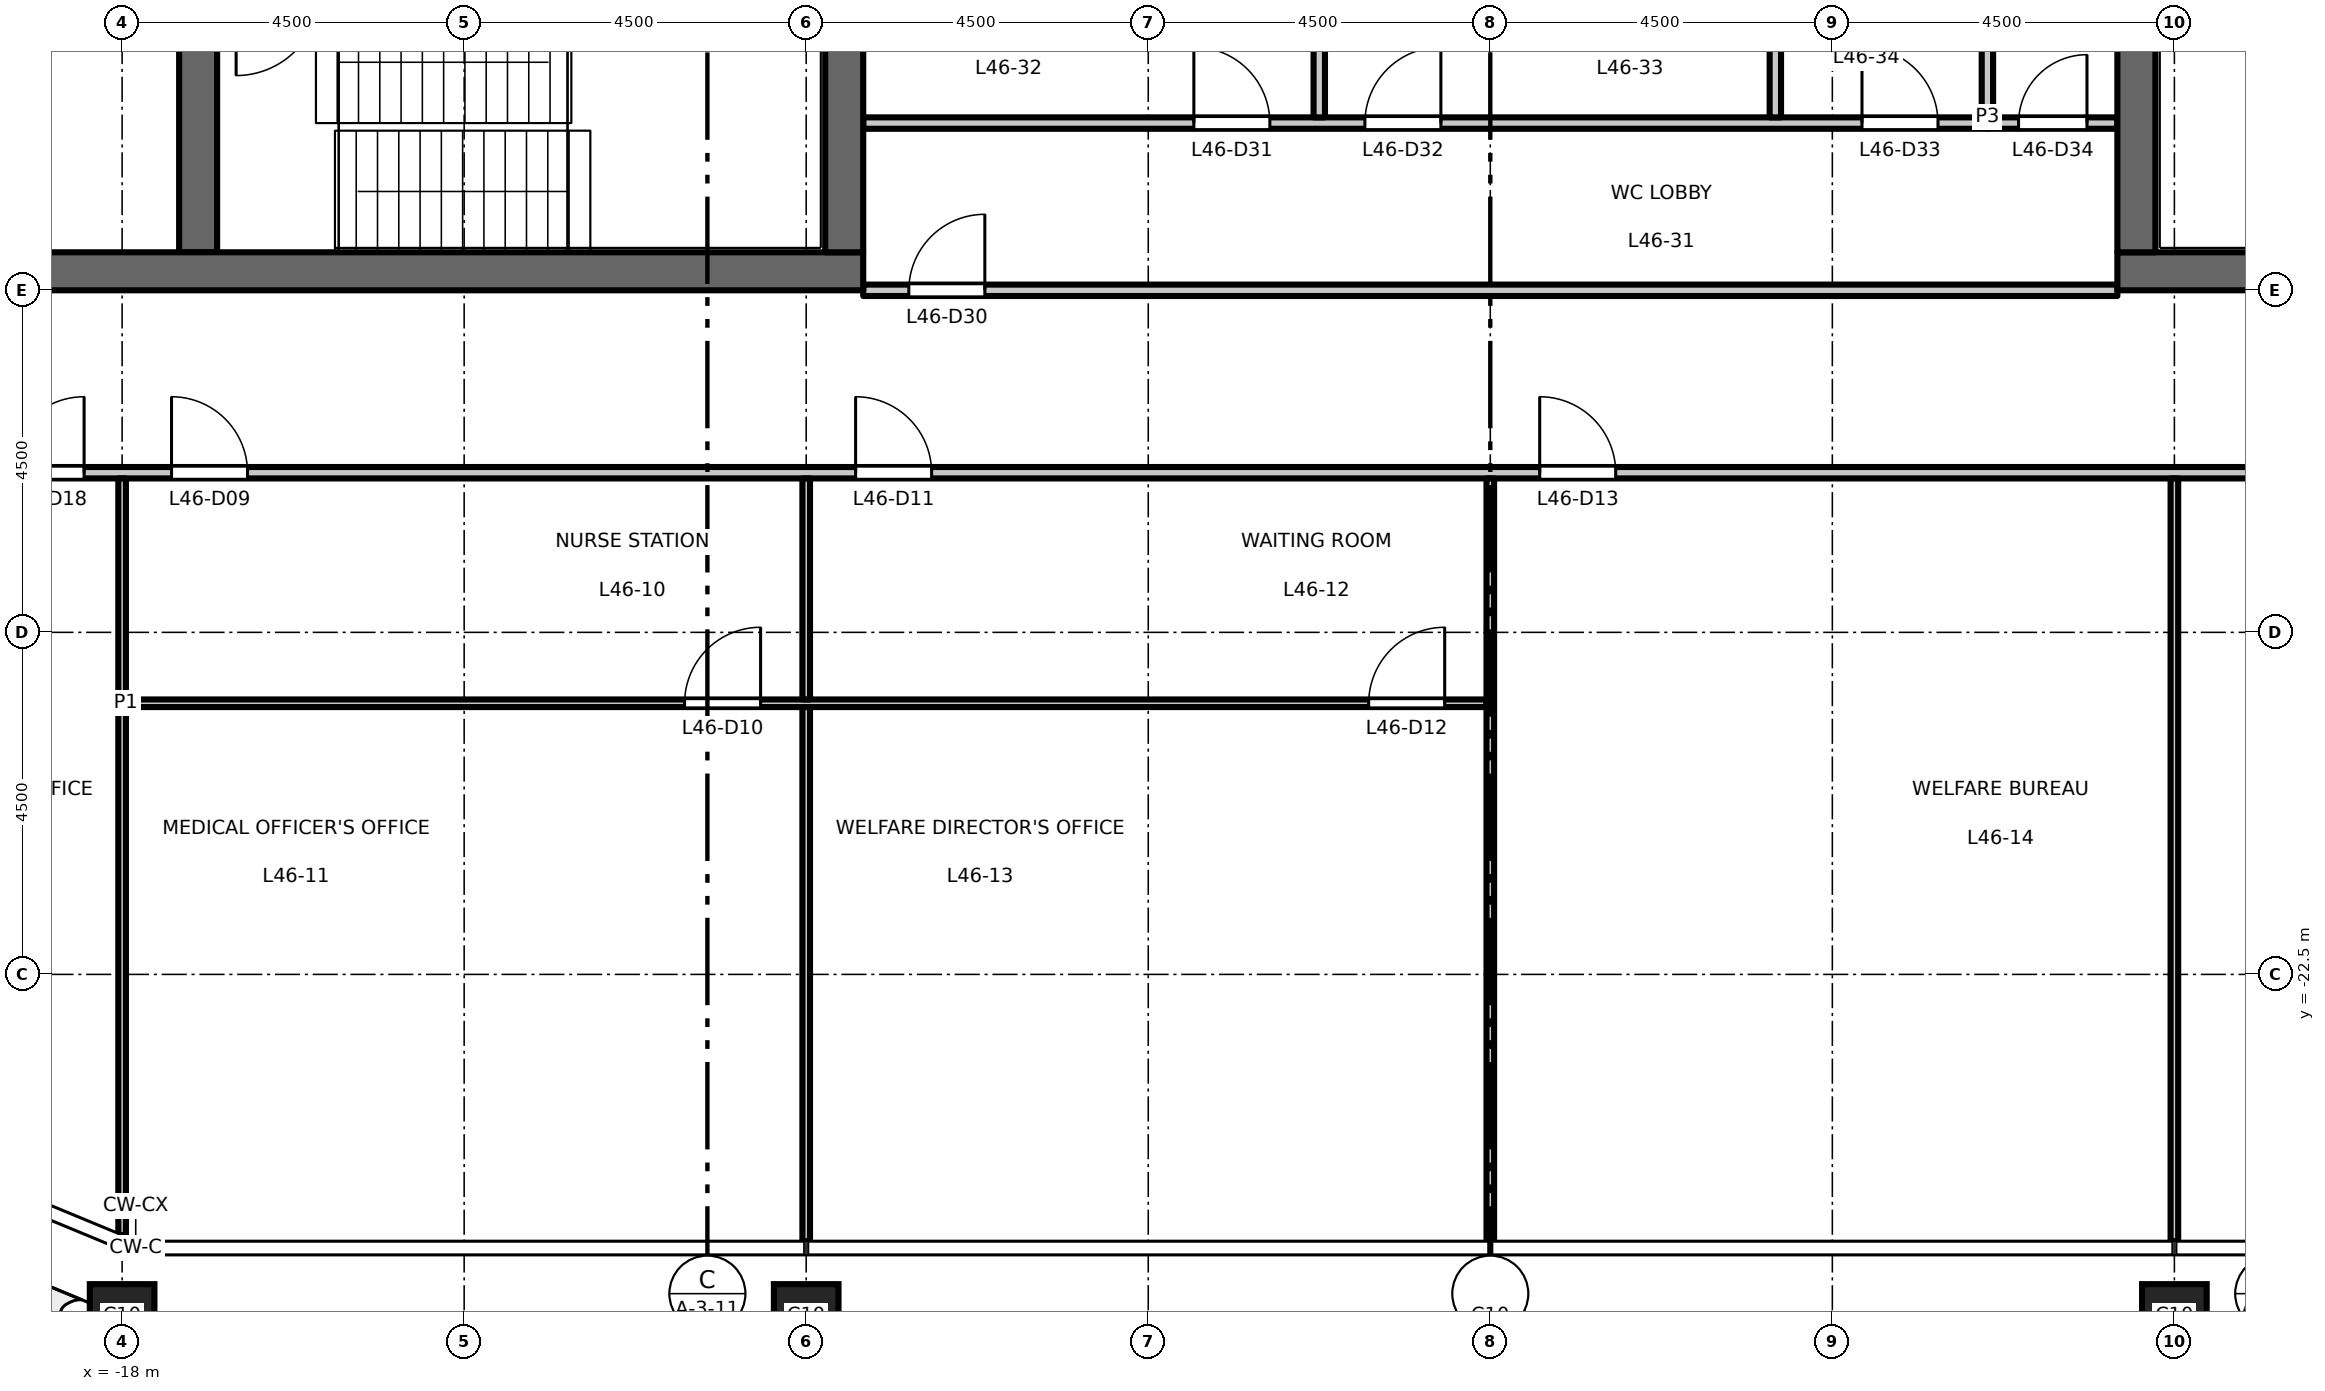
"""IFC4 building model, lengths in metres.
Left out: names, types, materials, properties, quantities, classifications, styles, units other than length and angle.
Written with IfcOpenShell. Run it as: python <this file> out.ifc"""

import sys

from ifc_helpers import new_model, si_unit, direction, frame, frame_2d, origin, origin_2d, place, context, subcontext, project, spatial, rectangle, hollow_rectangle, extrude, element, fill, save


model = new_model("IFC4")
c1 = context("Model", 3, precision=1e-05, world=origin(), true_north=direction((0.0, 1.0)))
c2 = subcontext(c1, "Body", "Model", "MODEL_VIEW")
j1 = project(units=[si_unit("LENGTHUNIT", "METRE"), si_unit("PLANEANGLEUNIT", "RADIAN")], contexts=[c1])
p1 = place(None, origin())
s1 = spatial("IfcSite", under=j1, at=p1, CompositionType="ELEMENT")
p2 = place(p1, origin())
s2 = spatial("IfcBuilding", under=s1, at=p2, CompositionType="ELEMENT")
p3 = place(p2, frame((0.0, 0.0, 215.2)))
s3 = spatial("IfcBuildingStorey", under=s2, at=p3, CompositionType="ELEMENT", Elevation=215.2)
for number, where, z_axis, x_axis in (
    (1, (-18.0, -27.0, 0.0), (0.0, 0.0, 1.0), (1.0, 0.0, 0.0)),
    (2, (-9.0, -27.0, 0.0), (0.0, 0.0, 1.0), (1.0, 0.0, 0.0)),
    (3, (0.0, -27.0, 0.0), (0.0, 0.0, 1.0), (1.0, 0.0, 0.0)),
    (4, (9.0, -27.0, 0.0), (0.0, 0.0, 1.0), (1.0, 0.0, 0.0)),
):
    element("IfcColumn", number, at=place(p3, frame(where, z_axis=z_axis, x_axis=x_axis)), inside=s3, PredefinedType="COLUMN", context=c2, shape_type="SweptSolid", body=[
        extrude(hollow_rectangle(XDim=0.85, YDim=0.85, WallThickness=0.05, at=origin_2d()), origin(), (0.0, 0.0, 1.0), 4.5),
    ])
p4 = place(p3, frame((-17.0, -13.0, 0.0), z_axis=(0.0, 0.0, 1.0), x_axis=(0.0, 1.0, 0.0)))
e5 = element("IfcWall", 5, at=p4, inside=s3, PredefinedType="SHEAR", context=c2, shape_type="SweptSolid", body=[
    extrude(rectangle(XDim=6.575, YDim=0.5, at=frame_2d((3.288, 0.0))), origin(), (0.0, 0.0, 1.0), 4.35),
])
p5 = place(p3, frame((-8.25, -13.25, 0.0), z_axis=(0.0, 0.0, 1.0), x_axis=(-1.0, 0.0, 0.0)))
e6 = element("IfcWall", 6, at=p5, inside=s3, PredefinedType="SHEAR", context=c2, shape_type="SweptSolid", body=[
    extrude(rectangle(XDim=13.5, YDim=0.5, at=frame_2d((6.75, 0.0))), origin(), (0.0, 0.0, 1.0), 4.35),
])
p6 = place(p3, frame((-8.5, -13.0, 0.0), z_axis=(0.0, 0.0, 1.0), x_axis=(0.0, 1.0, 0.0)))
e7 = element("IfcWall", 7, at=p6, inside=s3, PredefinedType="SHEAR", context=c2, shape_type="SweptSolid", body=[
    extrude(rectangle(XDim=26.0, YDim=0.5, at=frame_2d((13.0, 0.0))), origin(), (0.0, 0.0, 1.0), 4.35),
])
p7 = place(p3, frame((8.25, -13.25, 0.0), z_axis=(0.0, 0.0, 1.0), x_axis=(1.0, 0.0, 0.0)))
e8 = element("IfcWall", 8, at=p7, inside=s3, PredefinedType="SHEAR", context=c2, shape_type="SweptSolid", body=[
    extrude(rectangle(XDim=13.5, YDim=0.5, at=frame_2d((6.75, 0.0))), origin(), (0.0, 0.0, 1.0), 4.35),
])
p8 = place(p3, frame((8.5, -13.0, 0.0), z_axis=(0.0, 0.0, 1.0), x_axis=(0.0, 1.0, 0.0)))
e9 = element("IfcWall", 9, at=p8, inside=s3, PredefinedType="SHEAR", context=c2, shape_type="SweptSolid", body=[
    extrude(rectangle(XDim=26.0, YDim=0.5, at=frame_2d((13.0, 0.0))), origin(), (0.0, 0.0, 1.0), 4.35),
])
p9 = place(p3, frame((-17.95, -18.933, 0.0), z_axis=(0.0, 0.0, 1.0), x_axis=(1.0, 0.0, 0.0)))
e10 = element("IfcWall", 10, at=p9, inside=s3, PredefinedType="PARTITIONING", context=c2, shape_type="SweptSolid", body=[
    extrude(rectangle(XDim=17.9, YDim=0.1, at=frame_2d((8.95, 0.0))), origin(), (0.0, 0.0, 1.0), 4.35),
])
p10 = place(p9, frame((7.35, 0.0, 0.0)))
e11 = element("IfcOpeningElement", 11, at=p10, cuts=e10, PredefinedType="OPENING", context=c2, shape_type="SweptSolid", body=[
    extrude(rectangle(XDim=1.0, YDim=2.1, at=frame_2d((0.5, 1.05))), frame((0.0, 0.06, 0.0), z_axis=(0.0, -1.0, 0.0), x_axis=(1.0, 0.0, 0.0)), (0.0, 0.0, 1.0), 0.12),
])
p11 = place(p9, frame((16.35, 0.0, 0.0)))
e12 = element("IfcOpeningElement", 12, at=p11, cuts=e10, PredefinedType="OPENING", context=c2, shape_type="SweptSolid", body=[
    extrude(rectangle(XDim=1.0, YDim=2.1, at=frame_2d((0.5, 1.05))), frame((0.0, 0.06, 0.0), z_axis=(0.0, -1.0, 0.0), x_axis=(1.0, 0.0, 0.0)), (0.0, 0.0, 1.0), 0.12),
])
p12 = place(p3, frame((-24.225, -15.9, 0.0), z_axis=(0.0, 0.0, 1.0), x_axis=(1.0, 0.0, 0.0)))
e13 = element("IfcWall", 13, at=p12, inside=s3, PredefinedType="PARTITIONING", context=c2, shape_type="SweptSolid", body=[
    extrude(rectangle(XDim=48.45, YDim=0.15, at=frame_2d((24.225, 0.0))), origin(), (0.0, 0.0, 1.0), 4.35),
])
p13 = place(p12, frame((6.875, 0.0, 0.0)))
e14 = element("IfcOpeningElement", 14, at=p13, cuts=e13, PredefinedType="OPENING", context=c2, shape_type="SweptSolid", body=[
    extrude(rectangle(XDim=1.0, YDim=2.1, at=frame_2d((0.5, 1.05))), frame((0.0, 0.085, 0.0), z_axis=(0.0, -1.0, 0.0), x_axis=(1.0, 0.0, 0.0)), (0.0, 0.0, 1.0), 0.17),
])
p14 = place(p12, frame((15.875, 0.0, 0.0)))
e15 = element("IfcOpeningElement", 15, at=p14, cuts=e13, PredefinedType="OPENING", context=c2, shape_type="SweptSolid", body=[
    extrude(rectangle(XDim=1.0, YDim=2.1, at=frame_2d((0.5, 1.05))), frame((0.0, 0.085, 0.0), z_axis=(0.0, -1.0, 0.0), x_axis=(1.0, 0.0, 0.0)), (0.0, 0.0, 1.0), 0.17),
])
p15 = place(p12, frame((24.875, 0.0, 0.0)))
e16 = element("IfcOpeningElement", 16, at=p15, cuts=e13, PredefinedType="OPENING", context=c2, shape_type="SweptSolid", body=[
    extrude(rectangle(XDim=1.0, YDim=2.1, at=frame_2d((0.5, 1.05))), frame((0.0, 0.085, 0.0), z_axis=(0.0, -1.0, 0.0), x_axis=(1.0, 0.0, 0.0)), (0.0, 0.0, 1.0), 0.17),
])
p16 = place(p12, frame((40.625, 0.0, 0.0)))
e17 = element("IfcOpeningElement", 17, at=p16, cuts=e13, PredefinedType="OPENING", context=c2, shape_type="SweptSolid", body=[
    extrude(rectangle(XDim=1.0, YDim=2.1, at=frame_2d((0.5, 1.05))), frame((0.0, 0.085, 0.0), z_axis=(0.0, -1.0, 0.0), x_axis=(1.0, 0.0, 0.0)), (0.0, 0.0, 1.0), 0.17),
])
p17 = place(p12, frame((4.725, 0.0, 0.0)))
e18 = element("IfcOpeningElement", 18, at=p17, cuts=e13, PredefinedType="OPENING", context=c2, shape_type="SweptSolid", body=[
    extrude(rectangle(XDim=1.0, YDim=2.1, at=frame_2d((0.5, 1.05))), frame((0.0, 0.085, 0.0), z_axis=(0.0, -1.0, 0.0), x_axis=(1.0, 0.0, 0.0)), (0.0, 0.0, 1.0), 0.17),
])
p18 = place(p12, frame((42.875, 0.0, 0.0)))
e19 = element("IfcOpeningElement", 19, at=p18, cuts=e13, PredefinedType="OPENING", context=c2, shape_type="SweptSolid", body=[
    extrude(rectangle(XDim=1.0, YDim=2.1, at=frame_2d((0.5, 1.05))), frame((0.0, 0.085, 0.0), z_axis=(0.0, -1.0, 0.0), x_axis=(1.0, 0.0, 0.0)), (0.0, 0.0, 1.0), 0.17),
])
p19 = place(p3, frame((-8.25, -13.5, 0.0), z_axis=(0.0, 0.0, 1.0), x_axis=(1.0, 0.0, 0.0)))
e20 = element("IfcWall", 20, at=p19, inside=s3, PredefinedType="PARTITIONING", context=c2, shape_type="SweptSolid", body=[
    extrude(rectangle(XDim=16.5, YDim=0.15, at=frame_2d((8.25, 0.0))), origin(), (0.0, 0.0, 1.0), 3.95),
])
p20 = place(p19, frame((0.6, 0.0, 0.0)))
e21 = element("IfcOpeningElement", 21, at=p20, cuts=e20, PredefinedType="OPENING", context=c2, shape_type="SweptSolid", body=[
    extrude(rectangle(XDim=1.0, YDim=2.1, at=frame_2d((0.5, 1.05))), frame((0.0, 0.085, 0.0), z_axis=(0.0, -1.0, 0.0), x_axis=(1.0, 0.0, 0.0)), (0.0, 0.0, 1.0), 0.17),
])
p21 = place(p3, frame((-8.25, -11.3, 0.0), z_axis=(0.0, 0.0, 1.0), x_axis=(1.0, 0.0, 0.0)))
e22 = element("IfcWall", 22, at=p21, inside=s3, PredefinedType="PARTITIONING", context=c2, shape_type="SweptSolid", body=[
    extrude(rectangle(XDim=14.79, YDim=0.15, at=frame_2d((7.395, 0.0))), origin(), (0.0, 0.0, 1.0), 4.35),
])
p22 = place(p21, frame((4.35, 0.0, 0.0)))
e23 = element("IfcOpeningElement", 23, at=p22, cuts=e22, PredefinedType="OPENING", context=c2, shape_type="SweptSolid", body=[
    extrude(rectangle(XDim=1.0, YDim=2.1, at=frame_2d((0.5, 1.05))), frame((0.0, 0.085, 0.0), z_axis=(0.0, -1.0, 0.0), x_axis=(1.0, 0.0, 0.0)), (0.0, 0.0, 1.0), 0.17),
])
p23 = place(p21, frame((6.6, 0.0, 0.0)))
e24 = element("IfcOpeningElement", 24, at=p23, cuts=e22, PredefinedType="OPENING", context=c2, shape_type="SweptSolid", body=[
    extrude(rectangle(XDim=1.0, YDim=2.1, at=frame_2d((0.5, 1.05))), frame((0.0, 0.085, 0.0), z_axis=(0.0, -1.0, 0.0), x_axis=(1.0, 0.0, 0.0)), (0.0, 0.0, 1.0), 0.17),
])
p24 = place(p21, frame((13.14, 0.0, 0.0)))
e25 = element("IfcOpeningElement", 25, at=p24, cuts=e22, PredefinedType="OPENING", context=c2, shape_type="SweptSolid", body=[
    extrude(rectangle(XDim=1.0, YDim=2.1, at=frame_2d((0.5, 1.05))), frame((0.0, 0.085, 0.0), z_axis=(0.0, -1.0, 0.0), x_axis=(1.0, 0.0, 0.0)), (0.0, 0.0, 1.0), 0.17),
])
p25 = place(p3, frame((6.54, -11.3, 0.0), z_axis=(0.0, 0.0, 1.0), x_axis=(1.0, 0.0, 0.0)))
e26 = element("IfcWall", 26, at=p25, inside=s3, PredefinedType="PARTITIONING", context=c2, shape_type="SweptSolid", body=[
    extrude(rectangle(XDim=1.71, YDim=0.15, at=frame_2d((0.855, 0.0))), origin(), (0.0, 0.0, 1.0), 4.35),
])
p26 = place(p25, frame((0.41, 0.0, 0.0)))
e27 = element("IfcOpeningElement", 27, at=p26, cuts=e26, PredefinedType="OPENING", context=c2, shape_type="SweptSolid", body=[
    extrude(rectangle(XDim=0.9, YDim=2.1, at=frame_2d((0.45, 1.05))), frame((0.0, 0.085, 0.0), z_axis=(0.0, -1.0, 0.0), x_axis=(1.0, 0.0, 0.0)), (0.0, 0.0, 1.0), 0.17),
])
p27 = place(p3, frame((-18.0, -25.928, 0.0), z_axis=(0.0, 0.0, 1.0), x_axis=(0.0, 1.0, 0.0)))
e28 = element("IfcWall", 28, at=p27, inside=s3, PredefinedType="PARTITIONING", context=c2, shape_type="SweptSolid", body=[
    extrude(rectangle(XDim=9.953, YDim=0.1, at=frame_2d((4.977, 0.0))), origin(), (0.0, 0.0, 1.0), 3.65),
])
p28 = place(p3, frame((-9.0, -26.01, 0.0), z_axis=(0.0, 0.0, 1.0), x_axis=(0.0, 1.0, 0.0)))
e29 = element("IfcWall", 29, at=p28, inside=s3, PredefinedType="PARTITIONING", context=c2, shape_type="SweptSolid", body=[
    extrude(rectangle(XDim=7.027, YDim=0.1, at=frame_2d((3.514, 0.0))), origin(), (0.0, 0.0, 1.0), 3.65),
])
p29 = place(p3, frame((-9.0, -18.883, 0.0), z_axis=(0.0, 0.0, 1.0), x_axis=(0.0, 1.0, 0.0)))
e30 = element("IfcWall", 30, at=p29, inside=s3, PredefinedType="PARTITIONING", context=c2, shape_type="SweptSolid", body=[
    extrude(rectangle(XDim=2.908, YDim=0.1, at=frame_2d((1.454, 0.0))), origin(), (0.0, 0.0, 1.0), 3.65),
])
p30 = place(p3, frame((-2.25, -11.225, 0.0), z_axis=(0.0, 0.0, 1.0), x_axis=(0.0, 1.0, 0.0)))
e31 = element("IfcWall", 31, at=p30, inside=s3, PredefinedType="PARTITIONING", context=c2, shape_type="SweptSolid", body=[
    extrude(rectangle(XDim=2.855, YDim=0.15, at=frame_2d((1.427, 0.0))), origin(), (0.0, 0.0, 1.0), 4.35),
])
p31 = place(p3, frame((0.0, -26.01, 0.0), z_axis=(0.0, 0.0, 1.0), x_axis=(0.0, 1.0, 0.0)))
e32 = element("IfcWall", 32, at=p31, inside=s3, PredefinedType="PARTITIONING", context=c2, shape_type="SweptSolid", body=[
    extrude(rectangle(XDim=10.035, YDim=0.1, at=frame_2d((5.018, 0.0))), origin(), (0.0, 0.0, 1.0), 3.55),
])
p32 = place(p3, frame((3.75, -11.225, 0.0), z_axis=(0.0, 0.0, 1.0), x_axis=(0.0, 1.0, 0.0)))
e33 = element("IfcWall", 33, at=p32, inside=s3, PredefinedType="PARTITIONING", context=c2, shape_type="SweptSolid", body=[
    extrude(rectangle(XDim=2.855, YDim=0.15, at=frame_2d((1.427, 0.0))), origin(), (0.0, 0.0, 1.0), 4.35),
])
p33 = place(p3, frame((6.54, -11.225, 0.0), z_axis=(0.0, 0.0, 1.0), x_axis=(0.0, 1.0, 0.0)))
e34 = element("IfcWall", 34, at=p33, inside=s3, PredefinedType="PARTITIONING", context=c2, shape_type="SweptSolid", body=[
    extrude(rectangle(XDim=3.039, YDim=0.15, at=frame_2d((1.52, 0.0))), origin(), (0.0, 0.0, 1.0), 4.35),
])
p34 = place(p3, frame((9.0, -26.01, 0.0), z_axis=(0.0, 0.0, 1.0), x_axis=(0.0, 1.0, 0.0)))
e35 = element("IfcWall", 35, at=p34, inside=s3, PredefinedType="PARTITIONING", context=c2, shape_type="SweptSolid", body=[
    extrude(rectangle(XDim=10.035, YDim=0.1, at=frame_2d((5.018, 0.0))), origin(), (0.0, 0.0, 1.0), 3.65),
])
p35 = place(p13, origin())
e36 = element("IfcDoor", 36, at=p35, inside=s3, OperationType="SINGLE_SWING_LEFT", PredefinedType="DOOR", context=c2, shape_type="SweptSolid", body=[
    extrude(rectangle(XDim=1.0, YDim=2.1, at=frame_2d((0.5, 1.05))), frame((0.0, 0.025, 0.0), z_axis=(0.0, -1.0, 0.0), x_axis=(1.0, 0.0, 0.0)), (0.0, 0.0, 1.0), 0.05),
])
fill(e14, e36)
p36 = place(p10, origin())
e37 = element("IfcDoor", 37, at=p36, inside=s3, OperationType="SINGLE_SWING_RIGHT", PredefinedType="DOOR", context=c2, shape_type="SweptSolid", body=[
    extrude(rectangle(XDim=1.0, YDim=2.1, at=frame_2d((0.5, 1.05))), frame((0.0, 0.025, 0.0), z_axis=(0.0, -1.0, 0.0), x_axis=(1.0, 0.0, 0.0)), (0.0, 0.0, 1.0), 0.05),
])
fill(e11, e37)
p37 = place(p14, origin())
e38 = element("IfcDoor", 38, at=p37, inside=s3, OperationType="SINGLE_SWING_LEFT", PredefinedType="DOOR", context=c2, shape_type="SweptSolid", body=[
    extrude(rectangle(XDim=1.0, YDim=2.1, at=frame_2d((0.5, 1.05))), frame((0.0, 0.025, 0.0), z_axis=(0.0, -1.0, 0.0), x_axis=(1.0, 0.0, 0.0)), (0.0, 0.0, 1.0), 0.05),
])
fill(e15, e38)
p38 = place(p11, origin())
e39 = element("IfcDoor", 39, at=p38, inside=s3, OperationType="SINGLE_SWING_RIGHT", PredefinedType="DOOR", context=c2, shape_type="SweptSolid", body=[
    extrude(rectangle(XDim=1.0, YDim=2.1, at=frame_2d((0.5, 1.05))), frame((0.0, 0.025, 0.0), z_axis=(0.0, -1.0, 0.0), x_axis=(1.0, 0.0, 0.0)), (0.0, 0.0, 1.0), 0.05),
])
fill(e12, e39)
p39 = place(p15, origin())
e40 = element("IfcDoor", 40, at=p39, inside=s3, OperationType="SINGLE_SWING_LEFT", PredefinedType="DOOR", context=c2, shape_type="SweptSolid", body=[
    extrude(rectangle(XDim=1.0, YDim=2.1, at=frame_2d((0.5, 1.05))), frame((0.0, 0.025, 0.0), z_axis=(0.0, -1.0, 0.0), x_axis=(1.0, 0.0, 0.0)), (0.0, 0.0, 1.0), 0.05),
])
fill(e16, e40)
p40 = place(p17, origin())
e41 = element("IfcDoor", 41, at=p40, inside=s3, OperationType="SINGLE_SWING_RIGHT", PredefinedType="DOOR", context=c2, shape_type="SweptSolid", body=[
    extrude(rectangle(XDim=1.0, YDim=2.1, at=frame_2d((0.5, 1.05))), frame((0.0, 0.025, 0.0), z_axis=(0.0, -1.0, 0.0), x_axis=(1.0, 0.0, 0.0)), (0.0, 0.0, 1.0), 0.05),
])
fill(e18, e41)
p41 = place(p20, origin())
e42 = element("IfcDoor", 42, at=p41, inside=s3, OperationType="SINGLE_SWING_RIGHT", PredefinedType="DOOR", context=c2, shape_type="SweptSolid", body=[
    extrude(rectangle(XDim=1.0, YDim=2.1, at=frame_2d((0.5, 1.05))), frame((0.0, 0.025, 0.0), z_axis=(0.0, -1.0, 0.0), x_axis=(1.0, 0.0, 0.0)), (0.0, 0.0, 1.0), 0.05),
])
fill(e21, e42)
p42 = place(p22, origin())
e43 = element("IfcDoor", 43, at=p42, inside=s3, OperationType="SINGLE_SWING_LEFT", PredefinedType="DOOR", context=c2, shape_type="SweptSolid", body=[
    extrude(rectangle(XDim=1.0, YDim=2.1, at=frame_2d((0.5, 1.05))), frame((0.0, 0.025, 0.0), z_axis=(0.0, -1.0, 0.0), x_axis=(1.0, 0.0, 0.0)), (0.0, 0.0, 1.0), 0.05),
])
fill(e23, e43)
p43 = place(p23, origin())
e44 = element("IfcDoor", 44, at=p43, inside=s3, OperationType="SINGLE_SWING_RIGHT", PredefinedType="DOOR", context=c2, shape_type="SweptSolid", body=[
    extrude(rectangle(XDim=1.0, YDim=2.1, at=frame_2d((0.5, 1.05))), frame((0.0, 0.025, 0.0), z_axis=(0.0, -1.0, 0.0), x_axis=(1.0, 0.0, 0.0)), (0.0, 0.0, 1.0), 0.05),
])
fill(e24, e44)
p44 = place(p24, origin())
e45 = element("IfcDoor", 45, at=p44, inside=s3, OperationType="SINGLE_SWING_LEFT", PredefinedType="DOOR", context=c2, shape_type="SweptSolid", body=[
    extrude(rectangle(XDim=1.0, YDim=2.1, at=frame_2d((0.5, 1.05))), frame((0.0, 0.025, 0.0), z_axis=(0.0, -1.0, 0.0), x_axis=(1.0, 0.0, 0.0)), (0.0, 0.0, 1.0), 0.05),
])
fill(e25, e45)
p45 = place(p26, origin())
e46 = element("IfcDoor", 46, at=p45, inside=s3, OperationType="SINGLE_SWING_RIGHT", PredefinedType="DOOR", context=c2, shape_type="SweptSolid", body=[
    extrude(rectangle(XDim=0.9, YDim=2.1, at=frame_2d((0.45, 1.05))), frame((0.0, 0.025, 0.0), z_axis=(0.0, -1.0, 0.0), x_axis=(1.0, 0.0, 0.0)), (0.0, 0.0, 1.0), 0.05),
])
fill(e27, e46)
save(model, sys.argv[1])
